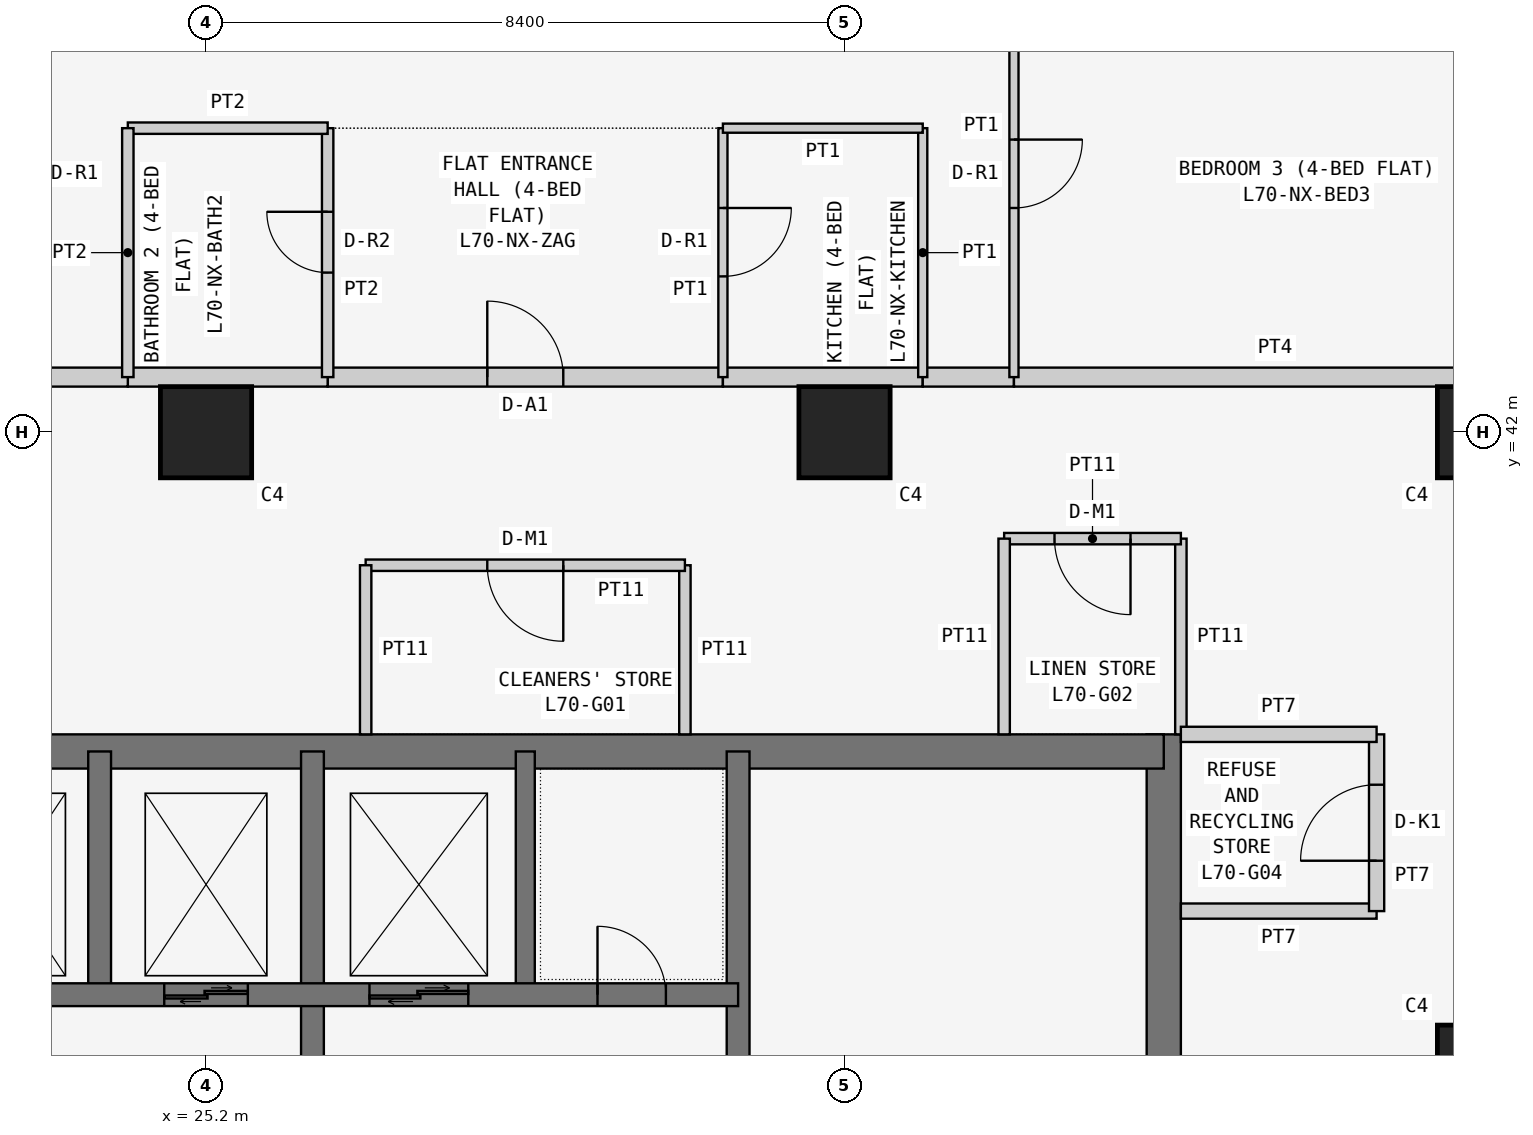
"""IFC4 building model, lengths in metres.
Left out: names, types, materials, properties, quantities, classifications, styles, units other than length and angle.
Written with IfcOpenShell. Run it as: python <this file> out.ifc"""

import sys

from ifc_helpers import new_model, si_unit, direction, frame, frame_2d, origin, origin_2d, place, context, subcontext, project, spatial, rectangle, extrude, element, fill, save


model = new_model("IFC4")
c1 = context("Model", 3, precision=1e-05, world=origin(), true_north=direction((0.0, 1.0)))
c2 = subcontext(c1, "Body", "Model", "MODEL_VIEW")
j1 = project(units=[si_unit("LENGTHUNIT", "METRE"), si_unit("PLANEANGLEUNIT", "RADIAN")], contexts=[c1])
p1 = place(None, origin())
s1 = spatial("IfcSite", under=j1, at=p1, CompositionType="ELEMENT")
p2 = place(p1, origin())
s2 = spatial("IfcBuilding", under=s1, at=p2, CompositionType="ELEMENT")
p3 = place(p2, frame((0.0, 0.0, 268.5)))
s3 = spatial("IfcBuildingStorey", under=s2, at=p3, CompositionType="ELEMENT", Elevation=268.5)
for number, where, z_axis, x_axis in (
    (1, (25.2, 42.0, 0.0), (0.0, 0.0, 1.0), (1.0, 0.0, 0.0)),
    (2, (33.6, 42.0, 0.0), (0.0, 0.0, 1.0), (1.0, 0.0, 0.0)),
    (3, (42.0, 33.6, 0.0), (0.0, 0.0, 1.0), (1.0, 0.0, 0.0)),
    (4, (42.0, 42.0, 0.0), (0.0, 0.0, 1.0), (1.0, 0.0, 0.0)),
):
    element("IfcColumn", number, at=place(p3, frame(where, z_axis=z_axis, x_axis=x_axis)), inside=s3, PredefinedType="COLUMN", context=c2, shape_type="SweptSolid", body=[
        extrude(rectangle(XDim=1.2, YDim=1.2, at=origin_2d()), origin(), (0.0, 0.0, 1.0), 3.6),
    ])
p4 = place(p3, frame((37.8, 21.0, 0.0), z_axis=(0.0, 0.0, 1.0), x_axis=(0.0, 1.0, 0.0)))
e5 = element("IfcWall", 5, at=p4, inside=s3, PredefinedType="SHEAR", context=c2, shape_type="SweptSolid", body=[
    extrude(rectangle(XDim=17.025, YDim=0.45, at=frame_2d((8.512, 0.0))), origin(), (0.0, 0.0, 1.0), 3.6),
])
p5 = place(p4, frame((5.2, 0.0, 0.0)))
e6 = element("IfcOpeningElement", 6, at=p5, cuts=e5, PredefinedType="OPENING", context=c2, shape_type="SweptSolid", body=[
    extrude(rectangle(XDim=1.2, YDim=2.1, at=frame_2d((0.6, 1.05))), frame((0.0, 0.235, 0.0), z_axis=(0.0, -1.0, 0.0), x_axis=(1.0, 0.0, 0.0)), (0.0, 0.0, 1.0), 0.47),
])
p6 = place(p3, frame((37.8, 37.8, 0.0), z_axis=(0.0, 0.0, 1.0), x_axis=(-1.0, 0.0, 0.0)))
e7 = element("IfcWall", 7, at=p6, inside=s3, PredefinedType="SHEAR", context=c2, shape_type="SweptSolid", body=[
    extrude(rectangle(XDim=17.025, YDim=0.45, at=frame_2d((8.513, 0.0))), origin(), (0.0, 0.0, 1.0), 3.6),
])
p7 = place(p3, frame((26.6, 21.0, 0.0), z_axis=(0.0, 0.0, 1.0), x_axis=(0.0, 1.0, 0.0)))
e8 = element("IfcWall", 8, at=p7, inside=s3, PredefinedType="SHEAR", context=c2, shape_type="SweptSolid", body=[
    extrude(rectangle(XDim=16.8, YDim=0.3, at=frame_2d((8.4, 0.0))), origin(), (0.0, 0.0, 1.0), 3.6),
])
p8 = place(p7, frame((10.4, 0.0, 0.0)))
e9 = element("IfcOpeningElement", 9, at=p8, cuts=e8, PredefinedType="OPENING", context=c2, shape_type="SweptSolid", body=[
    extrude(rectangle(XDim=1.2, YDim=2.1, at=frame_2d((0.6, 1.05))), frame((0.0, 0.16, 0.0), z_axis=(0.0, -1.0, 0.0), x_axis=(1.0, 0.0, 0.0)), (0.0, 0.0, 1.0), 0.32),
])
p9 = place(p3, frame((21.0, 34.6, 0.0), z_axis=(0.0, 0.0, 1.0), x_axis=(1.0, 0.0, 0.0)))
e10 = element("IfcWall", 10, at=p9, inside=s3, PredefinedType="SHEAR", context=c2, shape_type="SweptSolid", body=[
    extrude(rectangle(XDim=11.2, YDim=0.3, at=frame_2d((5.6, 0.0))), origin(), (0.0, 0.0, 1.0), 3.6),
])
p10 = place(p9, frame((9.35, 0.0, 0.0)))
e11 = element("IfcOpeningElement", 11, at=p10, cuts=e10, PredefinedType="OPENING", context=c2, shape_type="SweptSolid", body=[
    extrude(rectangle(XDim=0.9, YDim=2.1, at=frame_2d((0.45, 1.05))), frame((0.0, 0.16, 0.0), z_axis=(0.0, -1.0, 0.0), x_axis=(1.0, 0.0, 0.0)), (0.0, 0.0, 1.0), 0.32),
])
p11 = place(p9, frame((1.0, 0.0, 0.0)))
e12 = element("IfcOpeningElement", 12, at=p11, cuts=e10, PredefinedType="OPENING", context=c2, shape_type="SweptSolid", body=[
    extrude(rectangle(XDim=1.1, YDim=2.1, at=frame_2d((0.55, 1.05))), frame((0.0, 0.16, 0.0), z_axis=(0.0, -1.0, 0.0), x_axis=(1.0, 0.0, 0.0)), (0.0, 0.0, 1.0), 0.32),
])
p12 = place(p9, frame((3.65, 0.0, 0.0)))
e13 = element("IfcOpeningElement", 13, at=p12, cuts=e10, PredefinedType="OPENING", context=c2, shape_type="SweptSolid", body=[
    extrude(rectangle(XDim=1.1, YDim=2.1, at=frame_2d((0.55, 1.05))), frame((0.0, 0.16, 0.0), z_axis=(0.0, -1.0, 0.0), x_axis=(1.0, 0.0, 0.0)), (0.0, 0.0, 1.0), 0.32),
])
p13 = place(p9, frame((6.35, 0.0, 0.0)))
e14 = element("IfcOpeningElement", 14, at=p13, cuts=e10, PredefinedType="OPENING", context=c2, shape_type="SweptSolid", body=[
    extrude(rectangle(XDim=1.3, YDim=2.1, at=frame_2d((0.65, 1.05))), frame((0.0, 0.16, 0.0), z_axis=(0.0, -1.0, 0.0), x_axis=(1.0, 0.0, 0.0)), (0.0, 0.0, 1.0), 0.32),
])
p14 = place(p3, frame((23.8, 34.6, 0.0), z_axis=(0.0, 0.0, 1.0), x_axis=(0.0, 1.0, 0.0)))
e15 = element("IfcWall", 15, at=p14, inside=s3, PredefinedType="SHEAR", context=c2, shape_type="SweptSolid", body=[
    extrude(rectangle(XDim=3.2, YDim=0.3, at=frame_2d((1.6, 0.0))), origin(), (0.0, 0.0, 1.0), 3.6),
])
p15 = place(p3, frame((32.2, 29.25, 0.0), z_axis=(0.0, 0.0, 1.0), x_axis=(0.0, 1.0, 0.0)))
e16 = element("IfcWall", 16, at=p15, inside=s3, PredefinedType="SHEAR", context=c2, shape_type="SweptSolid", body=[
    extrude(rectangle(XDim=8.55, YDim=0.3, at=frame_2d((4.275, 0.0))), origin(), (0.0, 0.0, 1.0), 3.6),
])
p16 = place(p3, frame((29.4, 34.6, 0.0), z_axis=(0.0, 0.0, 1.0), x_axis=(0.0, 1.0, 0.0)))
e17 = element("IfcWall", 17, at=p16, inside=s3, PredefinedType="SHEAR", context=c2, shape_type="SweptSolid", body=[
    extrude(rectangle(XDim=3.2, YDim=0.25, at=frame_2d((1.6, 0.0))), origin(), (0.0, 0.0, 1.0), 3.6),
])
p17 = place(p3, frame((31.5, 38.025, 0.0), z_axis=(0.0, 0.0, 1.0), x_axis=(0.0, 1.0, 0.0)))
e18 = element("IfcWall", 18, at=p17, inside=s3, PredefinedType="PARTITIONING", context=c2, shape_type="SweptSolid", body=[
    extrude(rectangle(XDim=2.225, YDim=0.15, at=frame_2d((1.113, 0.0))), origin(), (0.0, 0.0, 1.0), 3.45),
])
p18 = place(p3, frame((31.5, 40.25, 0.0), z_axis=(0.0, 0.0, 1.0), x_axis=(-1.0, 0.0, 0.0)))
e19 = element("IfcWall", 19, at=p18, inside=s3, PredefinedType="PARTITIONING", context=c2, shape_type="SweptSolid", body=[
    extrude(rectangle(XDim=4.2, YDim=0.15, at=frame_2d((2.1, 0.0))), origin(), (0.0, 0.0, 1.0), 3.45),
])
p19 = place(p18, frame((1.6, 0.0, 0.0)))
e20 = element("IfcOpeningElement", 20, at=p19, cuts=e19, PredefinedType="OPENING", context=c2, shape_type="SweptSolid", body=[
    extrude(rectangle(XDim=1.0, YDim=2.1, at=frame_2d((0.5, 1.05))), frame((0.0, 0.085, 0.0), z_axis=(0.0, -1.0, 0.0), x_axis=(1.0, 0.0, 0.0)), (0.0, 0.0, 1.0), 0.17),
])
p20 = place(p3, frame((27.3, 40.25, 0.0), z_axis=(0.0, 0.0, 1.0), x_axis=(0.0, -1.0, 0.0)))
e21 = element("IfcWall", 21, at=p20, inside=s3, PredefinedType="PARTITIONING", context=c2, shape_type="SweptSolid", body=[
    extrude(rectangle(XDim=2.225, YDim=0.15, at=frame_2d((1.113, 0.0))), origin(), (0.0, 0.0, 1.0), 3.45),
])
p21 = place(p3, frame((38.025, 38.025, 0.0), z_axis=(0.0, 0.0, 1.0), x_axis=(0.0, 1.0, 0.0)))
e22 = element("IfcWall", 22, at=p21, inside=s3, PredefinedType="PARTITIONING", context=c2, shape_type="SweptSolid", body=[
    extrude(rectangle(XDim=2.575, YDim=0.15, at=frame_2d((1.288, 0.0))), origin(), (0.0, 0.0, 1.0), 3.45),
])
p22 = place(p3, frame((38.025, 40.6, 0.0), z_axis=(0.0, 0.0, 1.0), x_axis=(-1.0, 0.0, 0.0)))
e23 = element("IfcWall", 23, at=p22, inside=s3, PredefinedType="PARTITIONING", context=c2, shape_type="SweptSolid", body=[
    extrude(rectangle(XDim=2.325, YDim=0.15, at=frame_2d((1.163, 0.0))), origin(), (0.0, 0.0, 1.0), 3.45),
])
p23 = place(p22, frame((0.663, 0.0, 0.0)))
e24 = element("IfcOpeningElement", 24, at=p23, cuts=e23, PredefinedType="OPENING", context=c2, shape_type="SweptSolid", body=[
    extrude(rectangle(XDim=1.0, YDim=2.1, at=frame_2d((0.5, 1.05))), frame((0.0, 0.085, 0.0), z_axis=(0.0, -1.0, 0.0), x_axis=(1.0, 0.0, 0.0)), (0.0, 0.0, 1.0), 0.17),
])
p24 = place(p3, frame((35.7, 40.6, 0.0), z_axis=(0.0, 0.0, 1.0), x_axis=(0.0, -1.0, 0.0)))
e25 = element("IfcWall", 25, at=p24, inside=s3, PredefinedType="PARTITIONING", context=c2, shape_type="SweptSolid", body=[
    extrude(rectangle(XDim=2.575, YDim=0.15, at=frame_2d((1.288, 0.0))), origin(), (0.0, 0.0, 1.0), 3.45),
])
p25 = place(p3, frame((38.025, 35.7, 0.0), z_axis=(0.0, 0.0, 1.0), x_axis=(1.0, 0.0, 0.0)))
e26 = element("IfcWall", 26, at=p25, inside=s3, PredefinedType="PARTITIONING", context=c2, shape_type="SweptSolid", body=[
    extrude(rectangle(XDim=2.575, YDim=0.2, at=frame_2d((1.288, 0.0))), origin(), (0.0, 0.0, 1.0), 3.45),
])
p26 = place(p3, frame((40.6, 35.7, 0.0), z_axis=(0.0, 0.0, 1.0), x_axis=(0.0, 1.0, 0.0)))
e27 = element("IfcWall", 27, at=p26, inside=s3, PredefinedType="PARTITIONING", context=c2, shape_type="SweptSolid", body=[
    extrude(rectangle(XDim=2.325, YDim=0.2, at=frame_2d((1.163, 0.0))), origin(), (0.0, 0.0, 1.0), 3.45),
])
p27 = place(p26, frame((0.663, 0.0, 0.0)))
e28 = element("IfcOpeningElement", 28, at=p27, cuts=e27, PredefinedType="OPENING", context=c2, shape_type="SweptSolid", body=[
    extrude(rectangle(XDim=1.0, YDim=2.1, at=frame_2d((0.5, 1.05))), frame((0.0, 0.11, 0.0), z_axis=(0.0, -1.0, 0.0), x_axis=(1.0, 0.0, 0.0)), (0.0, 0.0, 1.0), 0.22),
])
p28 = place(p3, frame((40.6, 38.025, 0.0), z_axis=(0.0, 0.0, 1.0), x_axis=(-1.0, 0.0, 0.0)))
e29 = element("IfcWall", 29, at=p28, inside=s3, PredefinedType="PARTITIONING", context=c2, shape_type="SweptSolid", body=[
    extrude(rectangle(XDim=2.575, YDim=0.2, at=frame_2d((1.288, 0.0))), origin(), (0.0, 0.0, 1.0), 3.45),
])
p29 = place(p3, frame((26.8, 42.725, 0.0), z_axis=(0.0, 0.0, 1.0), x_axis=(1.0, 0.0, 0.0)))
e30 = element("IfcWall", 30, at=p29, inside=s3, PredefinedType="PARTITIONING", context=c2, shape_type="SweptSolid", body=[
    extrude(rectangle(XDim=5.2, YDim=0.25, at=frame_2d((2.6, 0.0))), origin(), (0.0, 0.0, 1.0), 3.45),
])
p30 = place(p29, frame((2.1, 0.0, 0.0)))
e31 = element("IfcOpeningElement", 31, at=p30, cuts=e30, PredefinedType="OPENING", context=c2, shape_type="SweptSolid", body=[
    extrude(rectangle(XDim=1.0, YDim=2.1, at=frame_2d((0.5, 1.05))), frame((0.0, 0.135, 0.0), z_axis=(0.0, -1.0, 0.0), x_axis=(1.0, 0.0, 0.0)), (0.0, 0.0, 1.0), 0.27),
])
p31 = place(p3, frame((24.171, 42.725, 0.0), z_axis=(0.0, 0.0, 1.0), x_axis=(1.0, 0.0, 0.0)))
e32 = element("IfcWall", 32, at=p31, inside=s3, PredefinedType="PARTITIONING", context=c2, shape_type="SweptSolid", body=[
    extrude(rectangle(XDim=2.629, YDim=0.25, at=frame_2d((1.314, 0.0))), origin(), (0.0, 0.0, 1.0), 3.45),
])
p32 = place(p3, frame((32.0, 42.725, 0.0), z_axis=(0.0, 0.0, 1.0), x_axis=(1.0, 0.0, 0.0)))
e33 = element("IfcWall", 33, at=p32, inside=s3, PredefinedType="PARTITIONING", context=c2, shape_type="SweptSolid", body=[
    extrude(rectangle(XDim=2.629, YDim=0.25, at=frame_2d((1.314, 0.0))), origin(), (0.0, 0.0, 1.0), 3.45),
])
p33 = place(p3, frame((22.971, 42.725, 0.0), z_axis=(0.0, 0.0, 1.0), x_axis=(1.0, 0.0, 0.0)))
e34 = element("IfcWall", 34, at=p33, inside=s3, PredefinedType="PARTITIONING", context=c2, shape_type="SweptSolid", body=[
    extrude(rectangle(XDim=1.2, YDim=0.25, at=frame_2d((0.6, 0.0))), origin(), (0.0, 0.0, 1.0), 3.45),
])
p34 = place(p3, frame((34.629, 42.725, 0.0), z_axis=(0.0, 0.0, 1.0), x_axis=(1.0, 0.0, 0.0)))
e35 = element("IfcWall", 35, at=p34, inside=s3, PredefinedType="PARTITIONING", context=c2, shape_type="SweptSolid", body=[
    extrude(rectangle(XDim=1.2, YDim=0.25, at=frame_2d((0.6, 0.0))), origin(), (0.0, 0.0, 1.0), 3.45),
])
p35 = place(p3, frame((35.829, 42.725, 0.0), z_axis=(0.0, 0.0, 1.0), x_axis=(1.0, 0.0, 0.0)))
e36 = element("IfcWall", 36, at=p35, inside=s3, PredefinedType="PARTITIONING", context=c2, shape_type="SweptSolid", body=[
    extrude(rectangle(XDim=6.871, YDim=0.25, at=frame_2d((3.436, 0.0))), origin(), (0.0, 0.0, 1.0), 3.45),
])
p36 = place(p3, frame((26.8, 46.0, 0.0), z_axis=(0.0, 0.0, 1.0), x_axis=(0.0, -1.0, 0.0)))
e37 = element("IfcWall", 37, at=p36, inside=s3, PredefinedType="PARTITIONING", context=c2, shape_type="SweptSolid", body=[
    extrude(rectangle(XDim=3.275, YDim=0.15, at=frame_2d((1.637, 0.0))), origin(), (0.0, 0.0, 1.0), 3.45),
])
p37 = place(p36, frame((1.1, 0.0, 0.0)))
e38 = element("IfcOpeningElement", 38, at=p37, cuts=e37, PredefinedType="OPENING", context=c2, shape_type="SweptSolid", body=[
    extrude(rectangle(XDim=0.8, YDim=2.1, at=frame_2d((0.4, 1.05))), frame((0.0, 0.085, 0.0), z_axis=(0.0, -1.0, 0.0), x_axis=(1.0, 0.0, 0.0)), (0.0, 0.0, 1.0), 0.17),
])
p38 = place(p3, frame((32.0, 42.725, 0.0), z_axis=(0.0, 0.0, 1.0), x_axis=(0.0, 1.0, 0.0)))
e39 = element("IfcWall", 39, at=p38, inside=s3, PredefinedType="PARTITIONING", context=c2, shape_type="SweptSolid", body=[
    extrude(rectangle(XDim=3.275, YDim=0.12, at=frame_2d((1.637, 0.0))), origin(), (0.0, 0.0, 1.0), 3.45),
])
p39 = place(p38, frame((1.325, 0.0, 0.0)))
e40 = element("IfcOpeningElement", 40, at=p39, cuts=e39, PredefinedType="OPENING", context=c2, shape_type="SweptSolid", body=[
    extrude(rectangle(XDim=0.9, YDim=2.1, at=frame_2d((0.45, 1.05))), frame((0.0, 0.07, 0.0), z_axis=(0.0, -1.0, 0.0), x_axis=(1.0, 0.0, 0.0)), (0.0, 0.0, 1.0), 0.14),
])
p40 = place(p3, frame((26.8, 46.0, 0.0), z_axis=(0.0, 0.0, 1.0), x_axis=(-1.0, 0.0, 0.0)))
e41 = element("IfcWall", 41, at=p40, inside=s3, PredefinedType="PARTITIONING", context=c2, shape_type="SweptSolid", body=[
    extrude(rectangle(XDim=2.629, YDim=0.15, at=frame_2d((1.314, 0.0))), origin(), (0.0, 0.0, 1.0), 3.45),
])
p41 = place(p3, frame((24.171, 46.0, 0.0), z_axis=(0.0, 0.0, 1.0), x_axis=(0.0, -1.0, 0.0)))
e42 = element("IfcWall", 42, at=p41, inside=s3, PredefinedType="PARTITIONING", context=c2, shape_type="SweptSolid", body=[
    extrude(rectangle(XDim=3.275, YDim=0.15, at=frame_2d((1.637, 0.0))), origin(), (0.0, 0.0, 1.0), 3.45),
])
p42 = place(p3, frame((34.629, 42.725, 0.0), z_axis=(0.0, 0.0, 1.0), x_axis=(0.0, 1.0, 0.0)))
e43 = element("IfcWall", 43, at=p42, inside=s3, PredefinedType="PARTITIONING", context=c2, shape_type="SweptSolid", body=[
    extrude(rectangle(XDim=3.275, YDim=0.12, at=frame_2d((1.637, 0.0))), origin(), (0.0, 0.0, 1.0), 3.45),
])
p43 = place(p3, frame((34.629, 46.0, 0.0), z_axis=(0.0, 0.0, 1.0), x_axis=(-1.0, 0.0, 0.0)))
e44 = element("IfcWall", 44, at=p43, inside=s3, PredefinedType="PARTITIONING", context=c2, shape_type="SweptSolid", body=[
    extrude(rectangle(XDim=2.629, YDim=0.12, at=frame_2d((1.314, 0.0))), origin(), (0.0, 0.0, 1.0), 3.45),
])
p44 = place(p3, frame((35.829, 47.8, 0.0), z_axis=(0.0, 0.0, 1.0), x_axis=(0.0, -1.0, 0.0)))
e45 = element("IfcWall", 45, at=p44, inside=s3, PredefinedType="PARTITIONING", context=c2, shape_type="SweptSolid", body=[
    extrude(rectangle(XDim=5.075, YDim=0.12, at=frame_2d((2.538, 0.0))), origin(), (0.0, 0.0, 1.0), 3.45),
])
p45 = place(p44, frame((1.95, 0.0, 0.0)))
e46 = element("IfcOpeningElement", 46, at=p45, cuts=e45, PredefinedType="OPENING", context=c2, shape_type="SweptSolid", body=[
    extrude(rectangle(XDim=0.9, YDim=2.1, at=frame_2d((0.45, 1.05))), frame((0.0, 0.07, 0.0), z_axis=(0.0, -1.0, 0.0), x_axis=(1.0, 0.0, 0.0)), (0.0, 0.0, 1.0), 0.14),
])
p46 = place(p19, origin())
e47 = element("IfcDoor", 47, at=p46, inside=s3, OperationType="SINGLE_SWING_LEFT", PredefinedType="DOOR", context=c2, shape_type="SweptSolid", body=[
    extrude(rectangle(XDim=1.0, YDim=2.1, at=frame_2d((0.5, 1.05))), frame((0.0, 0.025, 0.0), z_axis=(0.0, -1.0, 0.0), x_axis=(1.0, 0.0, 0.0)), (0.0, 0.0, 1.0), 0.05),
])
fill(e20, e47)
p47 = place(p23, origin())
e48 = element("IfcDoor", 48, at=p47, inside=s3, OperationType="SINGLE_SWING_LEFT", PredefinedType="DOOR", context=c2, shape_type="SweptSolid", body=[
    extrude(rectangle(XDim=1.0, YDim=2.1, at=frame_2d((0.5, 1.05))), frame((0.0, 0.025, 0.0), z_axis=(0.0, -1.0, 0.0), x_axis=(1.0, 0.0, 0.0)), (0.0, 0.0, 1.0), 0.05),
])
fill(e24, e48)
p48 = place(p27, origin())
e49 = element("IfcDoor", 49, at=p48, inside=s3, OperationType="SINGLE_SWING_LEFT", PredefinedType="DOOR", context=c2, shape_type="SweptSolid", body=[
    extrude(rectangle(XDim=1.0, YDim=2.1, at=frame_2d((0.5, 1.05))), frame((0.0, 0.025, 0.0), z_axis=(0.0, -1.0, 0.0), x_axis=(1.0, 0.0, 0.0)), (0.0, 0.0, 1.0), 0.05),
])
fill(e28, e49)
p49 = place(p30, origin())
e50 = element("IfcDoor", 50, at=p49, inside=s3, OperationType="SINGLE_SWING_LEFT", PredefinedType="DOOR", context=c2, shape_type="SweptSolid", body=[
    extrude(rectangle(XDim=1.0, YDim=2.1, at=frame_2d((0.5, 1.05))), frame((0.0, 0.025, 0.0), z_axis=(0.0, -1.0, 0.0), x_axis=(1.0, 0.0, 0.0)), (0.0, 0.0, 1.0), 0.05),
])
fill(e31, e50)
p50 = place(p37, frame((0.8, 0.0, 0.0), z_axis=(0.0, 0.0, 1.0), x_axis=(-1.0, 0.0, 0.0)))
e51 = element("IfcDoor", 51, at=p50, inside=s3, OperationType="SINGLE_SWING_RIGHT", PredefinedType="DOOR", context=c2, shape_type="SweptSolid", body=[
    extrude(rectangle(XDim=0.8, YDim=2.1, at=frame_2d((0.4, 1.05))), frame((0.0, 0.025, 0.0), z_axis=(0.0, -1.0, 0.0), x_axis=(1.0, 0.0, 0.0)), (0.0, 0.0, 1.0), 0.05),
])
fill(e38, e51)
p51 = place(p39, frame((0.9, 0.0, 0.0), z_axis=(0.0, 0.0, 1.0), x_axis=(-1.0, 0.0, 0.0)))
e52 = element("IfcDoor", 52, at=p51, inside=s3, OperationType="SINGLE_SWING_LEFT", PredefinedType="DOOR", context=c2, shape_type="SweptSolid", body=[
    extrude(rectangle(XDim=0.9, YDim=2.1, at=frame_2d((0.45, 1.05))), frame((0.0, 0.025, 0.0), z_axis=(0.0, -1.0, 0.0), x_axis=(1.0, 0.0, 0.0)), (0.0, 0.0, 1.0), 0.05),
])
fill(e40, e52)
p52 = place(p45, origin())
e53 = element("IfcDoor", 53, at=p52, inside=s3, OperationType="SINGLE_SWING_LEFT", PredefinedType="DOOR", context=c2, shape_type="SweptSolid", body=[
    extrude(rectangle(XDim=0.9, YDim=2.1, at=frame_2d((0.45, 1.05))), frame((0.0, 0.025, 0.0), z_axis=(0.0, -1.0, 0.0), x_axis=(1.0, 0.0, 0.0)), (0.0, 0.0, 1.0), 0.05),
])
fill(e46, e53)
p53 = place(p10, origin())
e54 = element("IfcDoor", 54, at=p53, inside=s3, OperationType="SINGLE_SWING_LEFT", PredefinedType="DOOR", context=c2, shape_type="SweptSolid", body=[
    extrude(rectangle(XDim=0.9, YDim=2.1, at=frame_2d((0.45, 1.05))), frame((0.0, 0.025, 0.0), z_axis=(0.0, -1.0, 0.0), x_axis=(1.0, 0.0, 0.0)), (0.0, 0.0, 1.0), 0.05),
])
fill(e11, e54)
p54 = place(p12, origin())
e55 = element("IfcDoor", 55, at=p54, inside=s3, OperationType="DOUBLE_DOOR_SLIDING", PredefinedType="DOOR", context=c2, shape_type="SweptSolid", body=[
    extrude(rectangle(XDim=1.1, YDim=2.1, at=frame_2d((0.55, 1.05))), frame((0.0, 0.025, 0.0), z_axis=(0.0, -1.0, 0.0), x_axis=(1.0, 0.0, 0.0)), (0.0, 0.0, 1.0), 0.05),
])
fill(e13, e55)
p55 = place(p13, origin())
e56 = element("IfcDoor", 56, at=p55, inside=s3, OperationType="DOUBLE_DOOR_SLIDING", PredefinedType="DOOR", context=c2, shape_type="SweptSolid", body=[
    extrude(rectangle(XDim=1.3, YDim=2.1, at=frame_2d((0.65, 1.05))), frame((0.0, 0.025, 0.0), z_axis=(0.0, -1.0, 0.0), x_axis=(1.0, 0.0, 0.0)), (0.0, 0.0, 1.0), 0.05),
])
fill(e14, e56)
save(model, sys.argv[1])
